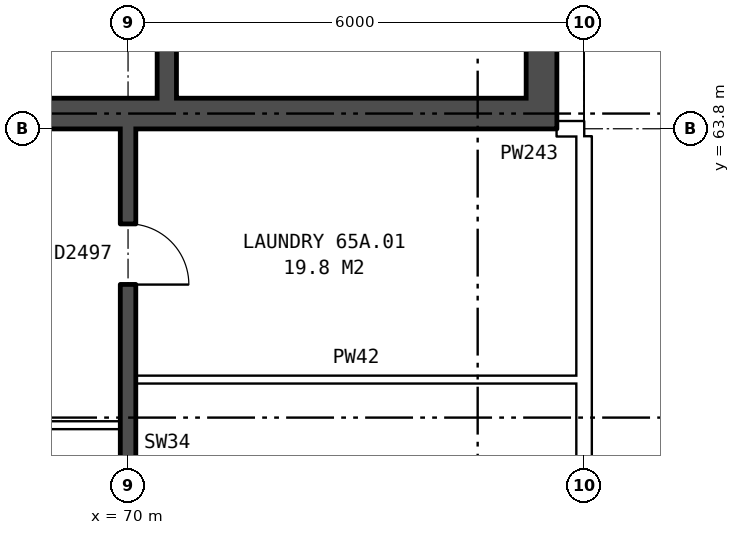
"""IFC4 building model, lengths in metres.
Left out: names, types, materials, properties, quantities, classifications, styles, units other than length and angle.
Written with IfcOpenShell. Run it as: python <this file> out.ifc"""

import sys

from ifc_helpers import new_model, si_unit, direction, frame, frame_2d, origin, place, context, subcontext, project, spatial, rectangle, extrude, element, fill, save


model = new_model("IFC4")
c1 = context("Model", 3, precision=1e-05, world=origin(), true_north=direction((0.0, 1.0)))
c2 = subcontext(c1, "Body", "Model", "MODEL_VIEW")
j1 = project(units=[si_unit("LENGTHUNIT", "METRE"), si_unit("PLANEANGLEUNIT", "RADIAN")], contexts=[c1])
p1 = place(None, origin())
s1 = spatial("IfcSite", under=j1, at=p1, CompositionType="ELEMENT")
p2 = place(p1, origin())
s2 = spatial("IfcBuilding", under=s1, at=p2, CompositionType="ELEMENT")
p3 = place(p2, frame((0.0, 0.0, 230.7)))
s3 = spatial("IfcBuildingStorey", under=s2, at=p3, CompositionType="ELEMENT", Elevation=230.7)
p4 = place(p3, frame((75.44, 63.8, 0.0), z_axis=(0.0, 0.0, 1.0), x_axis=(0.0, 1.0, 0.0)))
e1 = element("IfcWall", 1, at=p4, inside=s3, PredefinedType="SHEAR", context=c2, shape_type="SweptSolid", body=[
    extrude(rectangle(XDim=12.4, YDim=0.4, at=frame_2d((6.2, 0.0))), origin(), (0.0, 0.0, 1.0), 2.85),
])
p5 = place(p4, frame((9.8, 0.0, 0.0)))
e2 = element("IfcOpeningElement", 2, at=p5, cuts=e1, PredefinedType="OPENING", context=c2, shape_type="SweptSolid", body=[
    extrude(rectangle(XDim=1.1, YDim=2.1, at=frame_2d((0.55, 1.05))), frame((0.0, 0.21, 0.0), z_axis=(0.0, -1.0, 0.0), x_axis=(1.0, 0.0, 0.0)), (0.0, 0.0, 1.0), 0.42),
])
p6 = place(p3, frame((67.04, 64.0, 0.0), z_axis=(0.0, 0.0, 1.0), x_axis=(1.0, 0.0, 0.0)))
e3 = element("IfcWall", 3, at=p6, inside=s3, PredefinedType="SHEAR", context=c2, shape_type="SweptSolid", body=[
    extrude(rectangle(XDim=8.2, YDim=0.4, at=frame_2d((4.1, 0.0))), origin(), (0.0, 0.0, 1.0), 2.85),
])
p7 = place(p3, frame((70.51, 64.2, 0.0), z_axis=(0.0, 0.0, 1.0), x_axis=(0.0, 1.0, 0.0)))
e4 = element("IfcWall", 4, at=p7, inside=s3, PredefinedType="SHEAR", context=c2, shape_type="SweptSolid", body=[
    extrude(rectangle(XDim=2.525, YDim=0.25, at=frame_2d((1.263, 0.0))), origin(), (0.0, 0.0, 1.0), 2.85),
])
p8 = place(p3, frame((64.1, 59.9, 0.0), z_axis=(0.0, 0.0, 1.0), x_axis=(1.0, 0.0, 0.0)))
e5 = element("IfcWall", 5, at=p8, inside=s3, PredefinedType="PARTITIONING", context=c2, shape_type="SweptSolid", body=[
    extrude(rectangle(XDim=5.8, YDim=0.1, at=frame_2d((2.9, 0.0))), origin(), (0.0, 0.0, 1.0), 2.85),
])
p9 = place(p8, frame((3.6, 0.0, 0.0)))
e6 = element("IfcOpeningElement", 6, at=p9, cuts=e5, PredefinedType="OPENING", context=c2, shape_type="SweptSolid", body=[
    extrude(rectangle(XDim=0.9, YDim=2.1, at=frame_2d((0.45, 1.05))), frame((0.0, 0.06, 0.0), z_axis=(0.0, -1.0, 0.0), x_axis=(1.0, 0.0, 0.0)), (0.0, 0.0, 1.0), 0.12),
])
p10 = place(p8, frame((0.7, 0.0, 0.0)))
e7 = element("IfcOpeningElement", 7, at=p10, cuts=e5, PredefinedType="OPENING", context=c2, shape_type="SweptSolid", body=[
    extrude(rectangle(XDim=0.9, YDim=2.1, at=frame_2d((0.45, 1.05))), frame((0.0, 0.06, 0.0), z_axis=(0.0, -1.0, 0.0), x_axis=(1.0, 0.0, 0.0)), (0.0, 0.0, 1.0), 0.12),
])
p11 = place(p3, frame((70.1, 60.5, 0.0), z_axis=(0.0, 0.0, 1.0), x_axis=(1.0, 0.0, 0.0)))
e8 = element("IfcWall", 8, at=p11, inside=s3, PredefinedType="PARTITIONING", context=c2, shape_type="SweptSolid", body=[
    extrude(rectangle(XDim=5.8, YDim=0.1, at=frame_2d((2.9, 0.0))), origin(), (0.0, 0.0, 1.0), 2.85),
])
p12 = place(p3, frame((75.64, 63.8, 0.0), z_axis=(0.0, 0.0, 1.0), x_axis=(1.0, 0.0, 0.0)))
e9 = element("IfcWall", 9, at=p12, inside=s3, PredefinedType="PARTITIONING", context=c2, shape_type="SweptSolid", body=[
    extrude(rectangle(XDim=0.36, YDim=0.2, at=frame_2d((0.18, 0.0))), origin(), (0.0, 0.0, 1.0), 2.85),
])
p13 = place(p3, frame((70.0, 54.36, 0.0), z_axis=(0.0, 0.0, 1.0), x_axis=(0.0, 1.0, 0.0)))
e10 = element("IfcWall", 10, at=p13, inside=s3, PredefinedType="SOLIDWALL", context=c2, shape_type="SweptSolid", body=[
    extrude(rectangle(XDim=9.44, YDim=0.2, at=frame_2d((4.72, 0.0))), origin(), (0.0, 0.0, 1.0), 2.85),
])
p14 = place(p13, frame((2.32, 0.0, 0.0)))
e11 = element("IfcOpeningElement", 11, at=p14, cuts=e10, PredefinedType="OPENING", context=c2, shape_type="SweptSolid", body=[
    extrude(rectangle(XDim=0.9, YDim=2.1, at=frame_2d((0.45, 1.05))), frame((0.0, 0.11, 0.0), z_axis=(0.0, -1.0, 0.0), x_axis=(1.0, 0.0, 0.0)), (0.0, 0.0, 1.0), 0.22),
])
p15 = place(p13, frame((7.39, 0.0, 0.0)))
e12 = element("IfcOpeningElement", 12, at=p15, cuts=e10, PredefinedType="OPENING", context=c2, shape_type="SweptSolid", body=[
    extrude(rectangle(XDim=0.8, YDim=2.1, at=frame_2d((0.4, 1.05))), frame((0.0, 0.11, 0.0), z_axis=(0.0, -1.0, 0.0), x_axis=(1.0, 0.0, 0.0)), (0.0, 0.0, 1.0), 0.22),
])
p16 = place(p3, frame((76.0, 54.36, 0.0), z_axis=(0.0, 0.0, 1.0), x_axis=(0.0, 1.0, 0.0)))
e13 = element("IfcWall", 13, at=p16, inside=s3, PredefinedType="PARTITIONING", context=c2, shape_type="SweptSolid", body=[
    extrude(rectangle(XDim=9.34, YDim=0.2, at=frame_2d((4.67, 0.0))), origin(), (0.0, 0.0, 1.0), 2.85),
])
p17 = place(p15, frame((0.8, 0.0, 0.0), z_axis=(0.0, 0.0, 1.0), x_axis=(-1.0, 0.0, 0.0)))
e14 = element("IfcDoor", 14, at=p17, inside=s3, OperationType="SINGLE_SWING_RIGHT", PredefinedType="DOOR", context=c2, shape_type="SweptSolid", body=[
    extrude(rectangle(XDim=0.8, YDim=2.1, at=frame_2d((0.4, 1.05))), frame((0.0, 0.025, 0.0), z_axis=(0.0, -1.0, 0.0), x_axis=(1.0, 0.0, 0.0)), (0.0, 0.0, 1.0), 0.05),
])
fill(e12, e14)
save(model, sys.argv[1])
